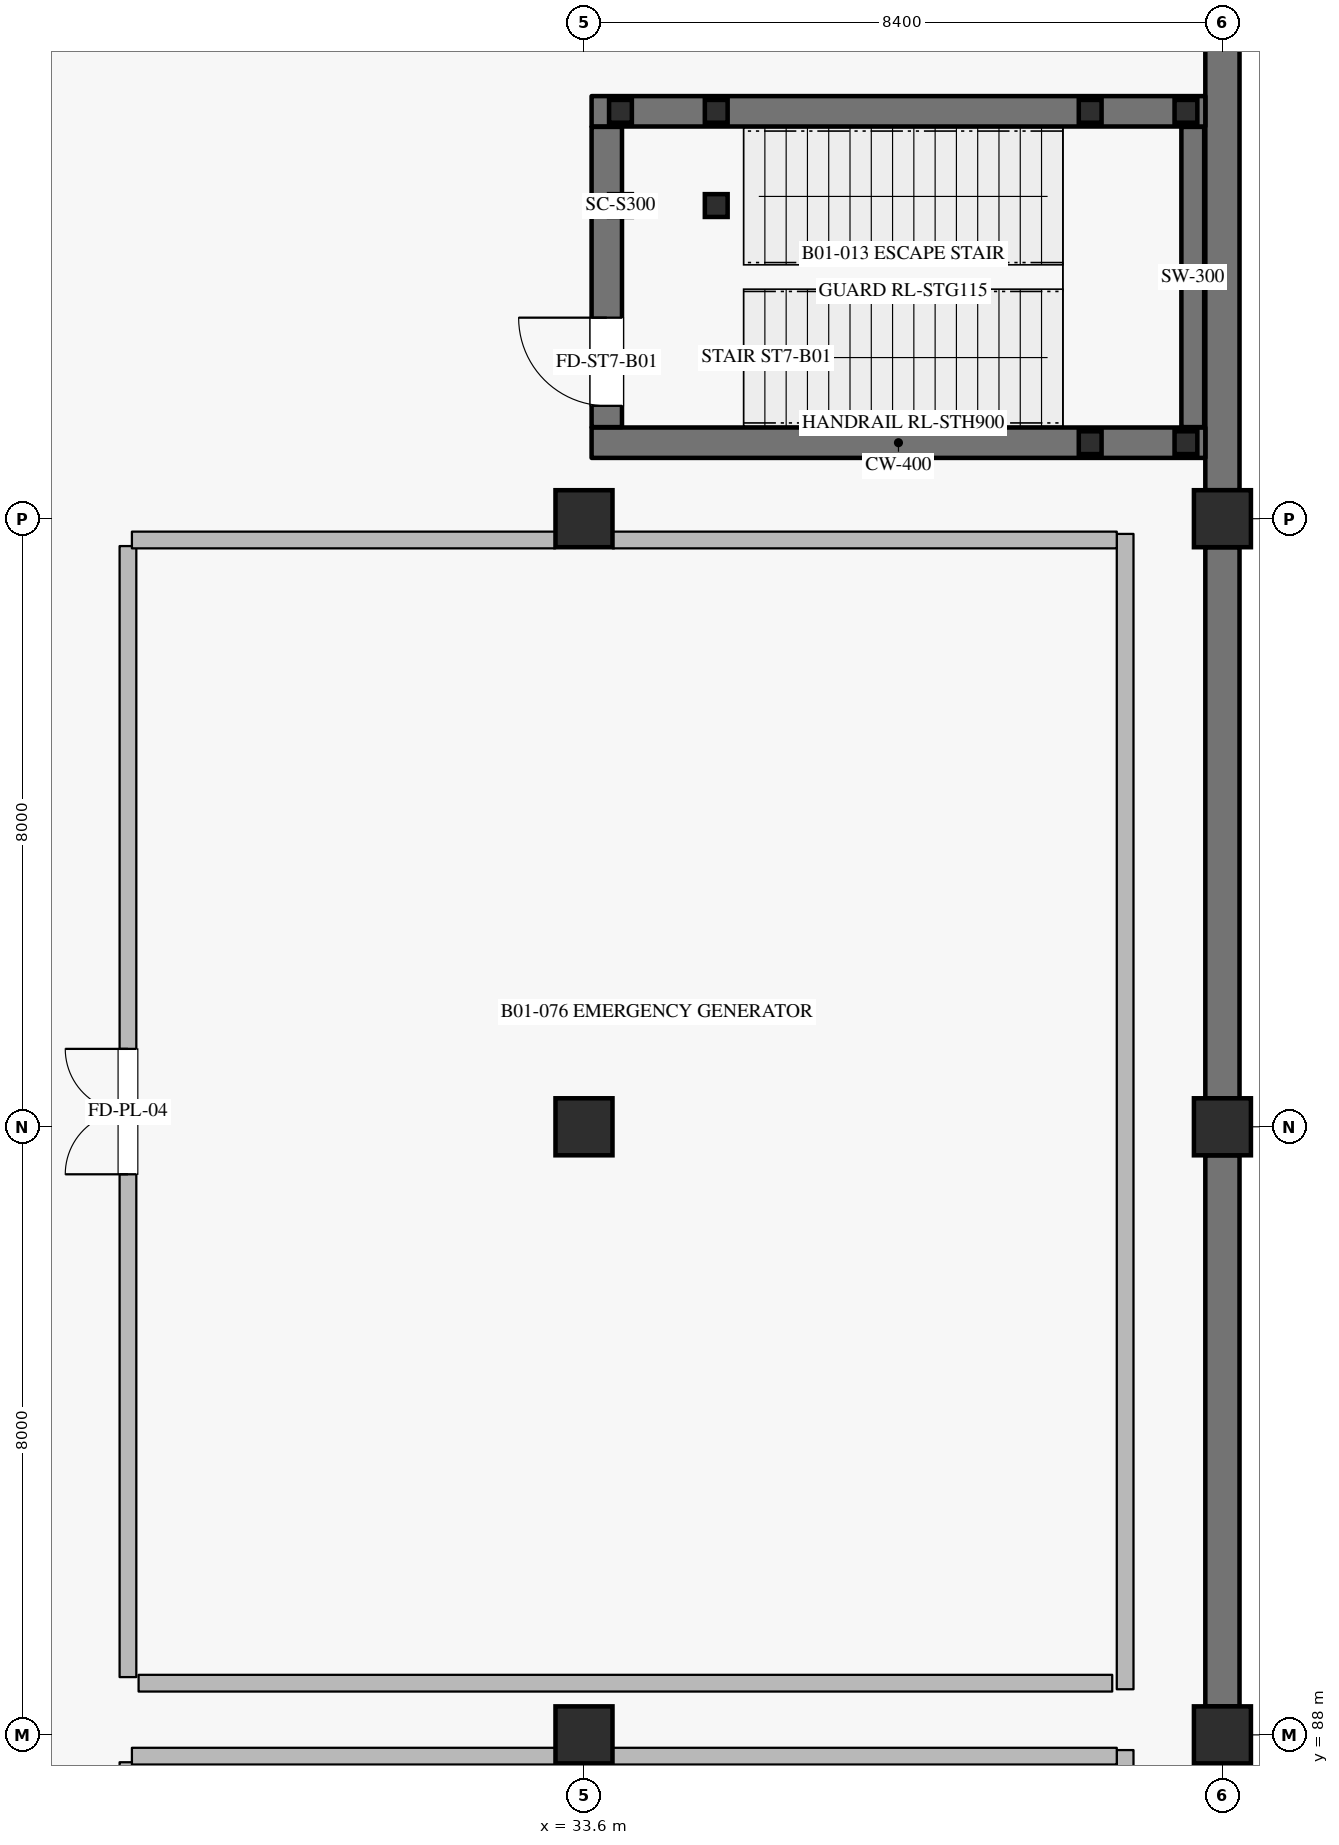
"""IFC4 building model, lengths in metres.
Left out: names, types, materials, properties, quantities, classifications, styles, units other than length and angle.
Written with IfcOpenShell. Run it as: python <this file> out.ifc"""

import sys

from ifc_helpers import new_model, si_unit, direction, frame, frame_2d, origin, origin_2d, place, context, subcontext, project, spatial, rectangle, hollow_rectangle, extrude, element, fill, save


model = new_model("IFC4")
c1 = context("Model", 3, precision=1e-05, world=origin(), true_north=direction((0.0, 1.0)))
c2 = subcontext(c1, "Body", "Model", "MODEL_VIEW")
j1 = project(units=[si_unit("LENGTHUNIT", "METRE"), si_unit("PLANEANGLEUNIT", "RADIAN")], contexts=[c1])
p1 = place(None, origin())
s1 = spatial("IfcSite", under=j1, at=p1, CompositionType="ELEMENT")
p2 = place(p1, origin())
s2 = spatial("IfcBuilding", under=s1, at=p2, CompositionType="ELEMENT")
p3 = place(p2, frame((0.0, 0.0, -5.4)))
s3 = spatial("IfcBuildingStorey", under=s2, at=p3, CompositionType="ELEMENT", Elevation=-5.4)
for number, where, z_axis, x_axis in (
    (1, (33.6, 88.0, 0.0), (0.0, 0.0, 1.0), (1.0, 0.0, 0.0)),
    (2, (33.6, 96.0, 0.0), (0.0, 0.0, 1.0), (1.0, 0.0, 0.0)),
    (3, (33.6, 104.0, 0.0), (0.0, 0.0, 1.0), (1.0, 0.0, 0.0)),
    (4, (42.0, 88.0, 0.0), (0.0, 0.0, 1.0), (1.0, 0.0, 0.0)),
    (5, (42.0, 96.0, 0.0), (0.0, 0.0, 1.0), (1.0, 0.0, 0.0)),
    (6, (42.0, 104.0, 0.0), (0.0, 0.0, 1.0), (1.0, 0.0, 0.0)),
):
    element("IfcColumn", number, at=place(p3, frame(where, z_axis=z_axis, x_axis=x_axis)), inside=s3, PredefinedType="COLUMN", context=c2, shape_type="SweptSolid", body=[
        extrude(rectangle(XDim=0.75, YDim=0.75, at=origin_2d()), origin(), (0.0, 0.0, 1.0), 5.4),
    ])
for number, where, z_axis, x_axis in (
    (7, (42.0, 111.625, 0.0), (0.0, 0.0, 1.0), (0.0, -1.0, 0.0)),
    (8, (42.0, 103.625, 0.0), (0.0, 0.0, 1.0), (0.0, -1.0, 0.0)),
    (9, (42.0, 95.625, 0.0), (0.0, 0.0, 1.0), (0.0, -1.0, 0.0)),
    (10, (42.0, 87.625, 0.0), (0.0, 0.0, 1.0), (0.0, -1.0, 0.0)),
):
    element("IfcWall", number, at=place(p3, frame(where, z_axis=z_axis, x_axis=x_axis)), inside=s3, PredefinedType="USERDEFINED", context=c2, shape_type="SweptSolid", body=[
        extrude(rectangle(XDim=7.25, YDim=0.45, at=frame_2d((3.625, 0.0))), origin(), (0.0, 0.0, 1.0), 4.3),
    ])
p4 = place(p3, frame((33.7, 105.0, 0.0), z_axis=(0.0, 0.0, 1.0), x_axis=(1.0, 0.0, 0.0)))
e11 = element("IfcWall", 11, at=p4, inside=s3, PredefinedType="SHEAR", context=c2, shape_type="SweptSolid", body=[
    extrude(rectangle(XDim=8.075, YDim=0.4, at=frame_2d((4.038, 0.0))), origin(), (0.0, 0.0, 1.0), 4.995),
])
p5 = place(p3, frame((41.61, 105.205, 0.0), z_axis=(0.0, 0.0, 1.0), x_axis=(0.0, 1.0, 0.0)))
e12 = element("IfcWall", 12, at=p5, inside=s3, PredefinedType="SHEAR", context=c2, shape_type="SweptSolid", body=[
    extrude(rectangle(XDim=3.95, YDim=0.3, at=frame_2d((1.975, 0.0))), origin(), (0.0, 0.0, 1.0), 4.995),
])
p6 = place(p3, frame((33.7, 109.36, 0.0), z_axis=(0.0, 0.0, 1.0), x_axis=(1.0, 0.0, 0.0)))
e13 = element("IfcWall", 13, at=p6, inside=s3, PredefinedType="SHEAR", context=c2, shape_type="SweptSolid", body=[
    extrude(rectangle(XDim=8.075, YDim=0.4, at=frame_2d((4.038, 0.0))), origin(), (0.0, 0.0, 1.0), 4.995),
])
p7 = place(p3, frame((33.9, 105.205, 0.0), z_axis=(0.0, 0.0, 1.0), x_axis=(0.0, 1.0, 0.0)))
e14 = element("IfcWall", 14, at=p7, inside=s3, PredefinedType="SHEAR", context=c2, shape_type="SweptSolid", body=[
    extrude(rectangle(XDim=3.95, YDim=0.4, at=frame_2d((1.975, 0.0))), origin(), (0.0, 0.0, 1.0), 4.995),
])
p8 = place(p7, frame((0.28, 0.0, 0.0)))
e15 = element("IfcOpeningElement", 15, at=p8, cuts=e14, PredefinedType="OPENING", context=c2, shape_type="SweptSolid", body=[
    extrude(rectangle(XDim=1.16, YDim=2.2, at=frame_2d((0.58, 1.1))), frame((0.0, 0.21, 0.0), z_axis=(0.0, -1.0, 0.0), x_axis=(1.0, 0.0, 0.0)), (0.0, 0.0, 1.0), 0.42),
])
for number, where, z_axis, x_axis in (
    (16, (34.08, 108.12, 0.0), (0.0, 0.0, 1.0), (1.0, 0.0, 0.0)),
    (17, (34.08, 109.36, 0.0), (0.0, 0.0, 1.0), (1.0, 0.0, 0.0)),
    (18, (35.34, 108.12, 0.0), (0.0, 0.0, 1.0), (1.0, 0.0, 0.0)),
    (19, (35.34, 109.36, 0.0), (0.0, 0.0, 1.0), (1.0, 0.0, 0.0)),
):
    element("IfcColumn", number, at=place(p3, frame(where, z_axis=z_axis, x_axis=x_axis)), inside=s3, PredefinedType="COLUMN", context=c2, shape_type="SweptSolid", body=[
        extrude(hollow_rectangle(XDim=0.3, YDim=0.3, WallThickness=0.012, at=origin_2d()), origin(), (0.0, 0.0, 1.0), 5.22),
    ])
for number, where, z_axis, x_axis in (
    (20, (40.26, 105.0, 0.0), (0.0, 0.0, 1.0), (1.0, 0.0, 0.0)),
    (21, (40.26, 109.36, 0.0), (0.0, 0.0, 1.0), (1.0, 0.0, 0.0)),
    (22, (41.52, 105.0, 0.0), (0.0, 0.0, 1.0), (1.0, 0.0, 0.0)),
    (23, (41.52, 109.36, 0.0), (0.0, 0.0, 1.0), (1.0, 0.0, 0.0)),
):
    element("IfcColumn", number, at=place(p3, frame(where, z_axis=z_axis, x_axis=x_axis)), inside=s3, PredefinedType="COLUMN", context=c2, shape_type="SweptSolid", body=[
        extrude(hollow_rectangle(XDim=0.3, YDim=0.3, WallThickness=0.012, at=origin_2d()), origin(), (0.0, 0.0, 1.0), 2.52),
    ])
p9 = place(p3, frame((27.6, 65.36, 0.0), z_axis=(0.0, 0.0, 1.0), x_axis=(0.0, 1.0, 0.0)))
e24 = element("IfcWall", 24, at=p9, inside=s3, PredefinedType="PARTITIONING", context=c2, shape_type="SweptSolid", body=[
    extrude(rectangle(XDim=22.28, YDim=0.22, at=frame_2d((11.14, 0.0))), origin(), (0.0, 0.0, 1.0), 4.995),
])
p10 = place(p9, frame((10.315, 0.0, 0.0)))
e25 = element("IfcOpeningElement", 25, at=p10, cuts=e24, PredefinedType="OPENING", context=c2, shape_type="SweptSolid", body=[
    extrude(rectangle(XDim=1.65, YDim=2.4, at=frame_2d((0.825, 1.2))), frame((0.0, 0.12, 0.0), z_axis=(0.0, -1.0, 0.0), x_axis=(1.0, 0.0, 0.0)), (0.0, 0.0, 1.0), 0.24),
])
p11 = place(p3, frame((27.6, 88.76, 0.0), z_axis=(0.0, 0.0, 1.0), x_axis=(0.0, 1.0, 0.0)))
e26 = element("IfcWall", 26, at=p11, inside=s3, PredefinedType="PARTITIONING", context=c2, shape_type="SweptSolid", body=[
    extrude(rectangle(XDim=14.88, YDim=0.22, at=frame_2d((7.44, 0.0))), origin(), (0.0, 0.0, 1.0), 4.995),
])
p12 = place(p11, frame((6.615, 0.0, 0.0)))
e27 = element("IfcOpeningElement", 27, at=p12, cuts=e26, PredefinedType="OPENING", context=c2, shape_type="SweptSolid", body=[
    extrude(rectangle(XDim=1.65, YDim=2.4, at=frame_2d((0.825, 1.2))), frame((0.0, 0.12, 0.0), z_axis=(0.0, -1.0, 0.0), x_axis=(1.0, 0.0, 0.0)), (0.0, 0.0, 1.0), 0.24),
])
p13 = place(p3, frame((27.74, 88.68, 0.0), z_axis=(0.0, 0.0, 1.0), x_axis=(1.0, 0.0, 0.0)))
e28 = element("IfcWall", 28, at=p13, inside=s3, PredefinedType="PARTITIONING", context=c2, shape_type="SweptSolid", body=[
    extrude(rectangle(XDim=12.81, YDim=0.22, at=frame_2d((6.405, 0.0))), origin(), (0.0, 0.0, 1.0), 4.995),
])
p14 = place(p3, frame((40.72, 65.2, 0.0), z_axis=(0.0, 0.0, 1.0), x_axis=(0.0, 1.0, 0.0)))
e29 = element("IfcWall", 29, at=p14, inside=s3, PredefinedType="PARTITIONING", context=c2, shape_type="SweptSolid", body=[
    extrude(rectangle(XDim=22.6, YDim=0.22, at=frame_2d((11.3, 0.0))), origin(), (0.0, 0.0, 1.0), 4.995),
])
p15 = place(p3, frame((27.652, 87.72, 0.0), z_axis=(0.0, 0.0, 1.0), x_axis=(1.0, 0.0, 0.0)))
e30 = element("IfcWall", 30, at=p15, inside=s3, PredefinedType="PARTITIONING", context=c2, shape_type="SweptSolid", body=[
    extrude(rectangle(XDim=5.573, YDim=0.22, at=frame_2d((2.787, 0.0))), origin(), (0.0, 0.0, 1.0), 4.2),
])
p16 = place(p3, frame((33.975, 87.72, 0.0), z_axis=(0.0, 0.0, 1.0), x_axis=(1.0, 0.0, 0.0)))
e31 = element("IfcWall", 31, at=p16, inside=s3, PredefinedType="PARTITIONING", context=c2, shape_type="SweptSolid", body=[
    extrude(rectangle(XDim=6.635, YDim=0.22, at=frame_2d((3.317, 0.0))), origin(), (0.0, 0.0, 1.0), 4.15),
])
p17 = place(p3, frame((40.72, 88.6, 0.0), z_axis=(0.0, 0.0, 1.0), x_axis=(0.0, 1.0, 0.0)))
e32 = element("IfcWall", 32, at=p17, inside=s3, PredefinedType="PARTITIONING", context=c2, shape_type="SweptSolid", body=[
    extrude(rectangle(XDim=15.2, YDim=0.22, at=frame_2d((7.6, 0.0))), origin(), (0.0, 0.0, 1.0), 4.995),
])
p18 = place(p3, frame((27.652, 103.72, 0.0), z_axis=(0.0, 0.0, 1.0), x_axis=(1.0, 0.0, 0.0)))
e33 = element("IfcWall", 33, at=p18, inside=s3, PredefinedType="PARTITIONING", context=c2, shape_type="SweptSolid", body=[
    extrude(rectangle(XDim=5.573, YDim=0.22, at=frame_2d((2.787, 0.0))), origin(), (0.0, 0.0, 1.0), 4.2),
])
p19 = place(p3, frame((33.975, 103.72, 0.0), z_axis=(0.0, 0.0, 1.0), x_axis=(1.0, 0.0, 0.0)))
e34 = element("IfcWall", 34, at=p19, inside=s3, PredefinedType="PARTITIONING", context=c2, shape_type="SweptSolid", body=[
    extrude(rectangle(XDim=6.635, YDim=0.22, at=frame_2d((3.317, 0.0))), origin(), (0.0, 0.0, 1.0), 4.15),
])
p20 = place(p8, origin())
e35 = element("IfcDoor", 35, at=p20, inside=s3, OperationType="SINGLE_SWING_RIGHT", PredefinedType="DOOR", context=c2, shape_type="SweptSolid", body=[
    extrude(rectangle(XDim=1.16, YDim=2.2, at=frame_2d((0.58, 1.1))), frame((0.0, 0.025, 0.0), z_axis=(0.0, -1.0, 0.0), x_axis=(1.0, 0.0, 0.0)), (0.0, 0.0, 1.0), 0.05),
])
fill(e15, e35)
p21 = place(p12, origin())
e36 = element("IfcDoor", 36, at=p21, inside=s3, OperationType="DOUBLE_DOOR_SINGLE_SWING", PredefinedType="DOOR", context=c2, shape_type="SweptSolid", body=[
    extrude(rectangle(XDim=1.65, YDim=2.4, at=frame_2d((0.825, 1.2))), frame((0.0, 0.025, 0.0), z_axis=(0.0, -1.0, 0.0), x_axis=(1.0, 0.0, 0.0)), (0.0, 0.0, 1.0), 0.05),
])
fill(e27, e36)
save(model, sys.argv[1])
